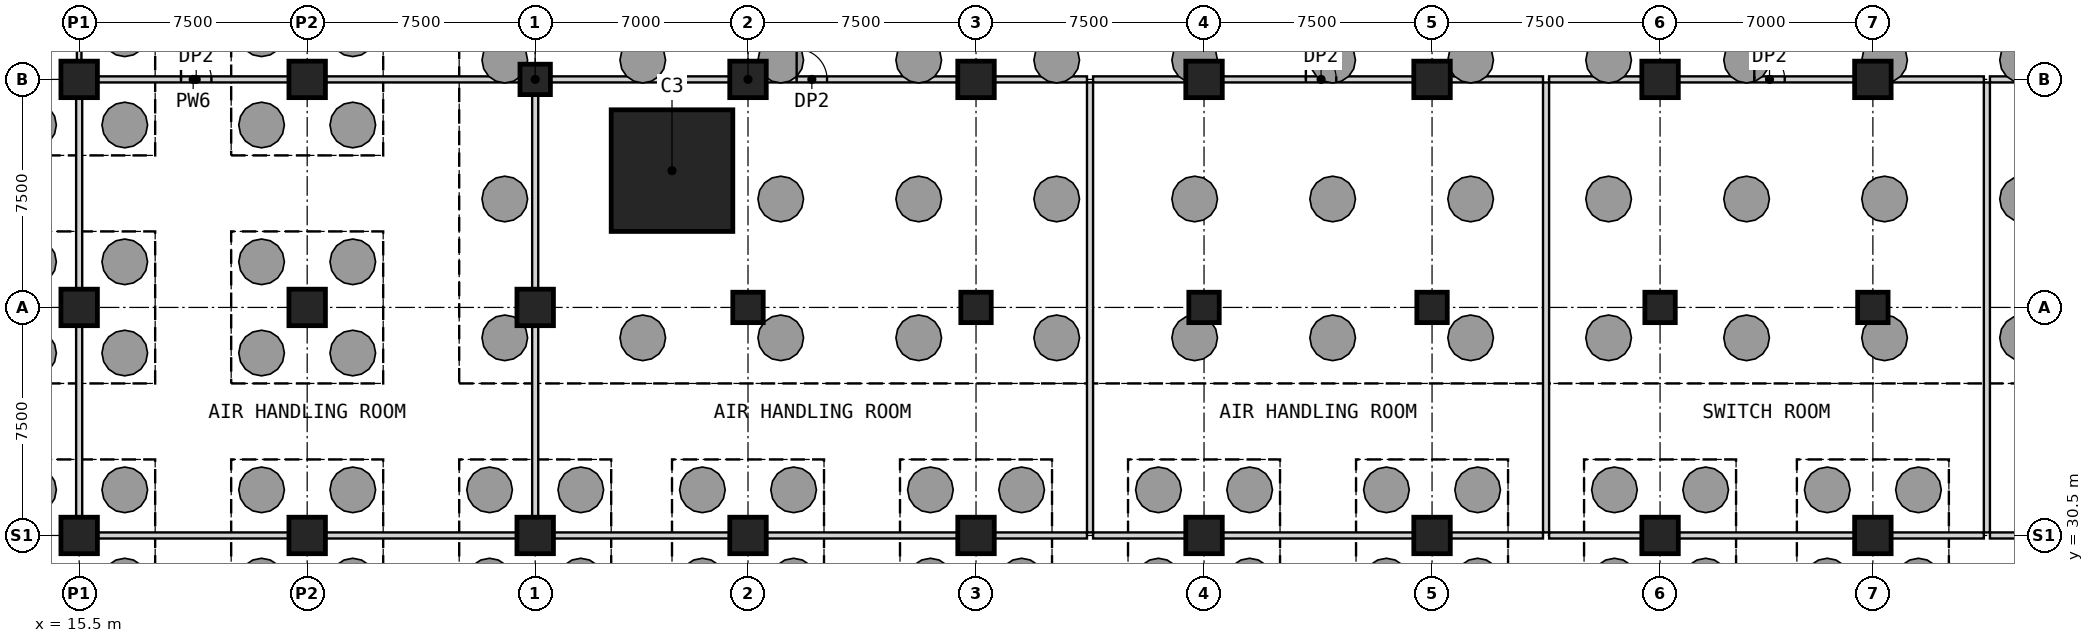
"""IFC4 building model, lengths in metres.
Left out: names, types, materials, properties, quantities, classifications, styles, units other than length and angle.
Written with IfcOpenShell. Run it as: python <this file> out.ifc"""

import sys

from ifc_helpers import new_model, si_unit, direction, frame, frame_2d, origin, origin_2d, place, context, subcontext, project, spatial, rectangle, extrude, element, fill, save


model = new_model("IFC4")
c1 = context("Model", 3, precision=1e-05, world=origin(), true_north=direction((0.0, 1.0)))
c2 = subcontext(c1, "Body", "Model", "MODEL_VIEW")
j1 = project(units=[si_unit("LENGTHUNIT", "METRE"), si_unit("PLANEANGLEUNIT", "RADIAN")], contexts=[c1])
p1 = place(None, origin())
s1 = spatial("IfcSite", under=j1, at=p1, CompositionType="ELEMENT")
p2 = place(p1, origin())
s2 = spatial("IfcBuilding", under=s1, at=p2, CompositionType="ELEMENT")
p3 = place(p2, frame((0.0, 0.0, -12.0)))
s3 = spatial("IfcBuildingStorey", under=s2, at=p3, CompositionType="ELEMENT", Elevation=-12.0)
for number, where, z_axis, x_axis in (
    (1, (30.5, 45.5, 0.0), (0.0, 0.0, 1.0), (1.0, 0.0, 0.0)),
    (2, (37.5, 38.0, 0.0), (0.0, 0.0, 1.0), (1.0, 0.0, 0.0)),
):
    element("IfcColumn", number, at=place(p3, frame(where, z_axis=z_axis, x_axis=x_axis)), inside=s3, PredefinedType="COLUMN", context=c2, shape_type="SweptSolid", body=[
        extrude(rectangle(XDim=1.0, YDim=1.0, at=origin_2d()), origin(), (0.0, 0.0, 1.0), 6.0),
    ])
p4 = place(p3, frame((37.5, 45.5, 0.0), z_axis=(0.0, 0.0, 1.0), x_axis=(1.0, 0.0, 0.0)))
e3 = element("IfcColumn", 3, at=p4, inside=s3, PredefinedType="COLUMN", context=c2, shape_type="SweptSolid", body=[
    extrude(rectangle(XDim=1.2, YDim=1.2, at=origin_2d()), origin(), (0.0, 0.0, 1.0), 6.0),
])
p5 = place(p3, frame((45.0, 38.0, 0.0), z_axis=(0.0, 0.0, 1.0), x_axis=(1.0, 0.0, 0.0)))
e4 = element("IfcColumn", 4, at=p5, inside=s3, PredefinedType="COLUMN", context=c2, shape_type="SweptSolid", body=[
    extrude(rectangle(XDim=1.0, YDim=1.0, at=origin_2d()), origin(), (0.0, 0.0, 1.0), 6.0),
])
p6 = place(p3, frame((45.0, 45.5, 0.0), z_axis=(0.0, 0.0, 1.0), x_axis=(1.0, 0.0, 0.0)))
e5 = element("IfcColumn", 5, at=p6, inside=s3, PredefinedType="COLUMN", context=c2, shape_type="SweptSolid", body=[
    extrude(rectangle(XDim=1.2, YDim=1.2, at=origin_2d()), origin(), (0.0, 0.0, 1.0), 6.0),
])
p7 = place(p3, frame((52.5, 38.0, 0.0), z_axis=(0.0, 0.0, 1.0), x_axis=(1.0, 0.0, 0.0)))
e6 = element("IfcColumn", 6, at=p7, inside=s3, PredefinedType="COLUMN", context=c2, shape_type="SweptSolid", body=[
    extrude(rectangle(XDim=1.0, YDim=1.0, at=origin_2d()), origin(), (0.0, 0.0, 1.0), 6.0),
])
p8 = place(p3, frame((52.5, 45.5, 0.0), z_axis=(0.0, 0.0, 1.0), x_axis=(1.0, 0.0, 0.0)))
e7 = element("IfcColumn", 7, at=p8, inside=s3, PredefinedType="COLUMN", context=c2, shape_type="SweptSolid", body=[
    extrude(rectangle(XDim=1.2, YDim=1.2, at=origin_2d()), origin(), (0.0, 0.0, 1.0), 6.0),
])
p9 = place(p3, frame((60.0, 38.0, 0.0), z_axis=(0.0, 0.0, 1.0), x_axis=(1.0, 0.0, 0.0)))
e8 = element("IfcColumn", 8, at=p9, inside=s3, PredefinedType="COLUMN", context=c2, shape_type="SweptSolid", body=[
    extrude(rectangle(XDim=1.0, YDim=1.0, at=origin_2d()), origin(), (0.0, 0.0, 1.0), 6.0),
])
p10 = place(p3, frame((60.0, 45.5, 0.0), z_axis=(0.0, 0.0, 1.0), x_axis=(1.0, 0.0, 0.0)))
e9 = element("IfcColumn", 9, at=p10, inside=s3, PredefinedType="COLUMN", context=c2, shape_type="SweptSolid", body=[
    extrude(rectangle(XDim=1.2, YDim=1.2, at=origin_2d()), origin(), (0.0, 0.0, 1.0), 6.0),
])
p11 = place(p3, frame((67.5, 38.0, 0.0), z_axis=(0.0, 0.0, 1.0), x_axis=(1.0, 0.0, 0.0)))
e10 = element("IfcColumn", 10, at=p11, inside=s3, PredefinedType="COLUMN", context=c2, shape_type="SweptSolid", body=[
    extrude(rectangle(XDim=1.0, YDim=1.0, at=origin_2d()), origin(), (0.0, 0.0, 1.0), 6.0),
])
p12 = place(p3, frame((67.5, 45.5, 0.0), z_axis=(0.0, 0.0, 1.0), x_axis=(1.0, 0.0, 0.0)))
e11 = element("IfcColumn", 11, at=p12, inside=s3, PredefinedType="COLUMN", context=c2, shape_type="SweptSolid", body=[
    extrude(rectangle(XDim=1.2, YDim=1.2, at=origin_2d()), origin(), (0.0, 0.0, 1.0), 6.0),
])
p13 = place(p3, frame((74.5, 38.0, 0.0), z_axis=(0.0, 0.0, 1.0), x_axis=(1.0, 0.0, 0.0)))
e12 = element("IfcColumn", 12, at=p13, inside=s3, PredefinedType="COLUMN", context=c2, shape_type="SweptSolid", body=[
    extrude(rectangle(XDim=1.0, YDim=1.0, at=origin_2d()), origin(), (0.0, 0.0, 1.0), 6.0),
])
p14 = place(p3, frame((74.5, 45.5, 0.0), z_axis=(0.0, 0.0, 1.0), x_axis=(1.0, 0.0, 0.0)))
e13 = element("IfcColumn", 13, at=p14, inside=s3, PredefinedType="COLUMN", context=c2, shape_type="SweptSolid", body=[
    extrude(rectangle(XDim=1.2, YDim=1.2, at=origin_2d()), origin(), (0.0, 0.0, 1.0), 6.0),
])
p15 = place(p3, frame((35.0, 42.5, 0.0), z_axis=(0.0, 0.0, 1.0), x_axis=(1.0, 0.0, 0.0)))
e14 = element("IfcColumn", 14, at=p15, inside=s3, PredefinedType="COLUMN", context=c2, shape_type="SweptSolid", body=[
    extrude(rectangle(XDim=4.0, YDim=4.0, at=origin_2d()), origin(), (0.0, 0.0, 1.0), 6.0),
])
for number, where, z_axis, x_axis in (
    (15, (15.5, 30.5, 0.0), (0.0, 0.0, 1.0), (1.0, 0.0, 0.0)),
    (16, (15.5, 38.0, 0.0), (0.0, 0.0, 1.0), (1.0, 0.0, 0.0)),
    (17, (15.5, 45.5, 0.0), (0.0, 0.0, 1.0), (1.0, 0.0, 0.0)),
    (18, (23.0, 30.5, 0.0), (0.0, 0.0, 1.0), (1.0, 0.0, 0.0)),
    (19, (23.0, 38.0, 0.0), (0.0, 0.0, 1.0), (1.0, 0.0, 0.0)),
    (20, (23.0, 45.5, 0.0), (0.0, 0.0, 1.0), (1.0, 0.0, 0.0)),
    (21, (30.5, 30.5, 0.0), (0.0, 0.0, 1.0), (1.0, 0.0, 0.0)),
    (22, (30.5, 38.0, 0.0), (0.0, 0.0, 1.0), (1.0, 0.0, 0.0)),
    (23, (37.5, 30.5, 0.0), (0.0, 0.0, 1.0), (1.0, 0.0, 0.0)),
    (24, (45.0, 30.5, 0.0), (0.0, 0.0, 1.0), (1.0, 0.0, 0.0)),
    (25, (52.5, 30.5, 0.0), (0.0, 0.0, 1.0), (1.0, 0.0, 0.0)),
    (26, (60.0, 30.5, 0.0), (0.0, 0.0, 1.0), (1.0, 0.0, 0.0)),
    (27, (67.5, 30.5, 0.0), (0.0, 0.0, 1.0), (1.0, 0.0, 0.0)),
    (28, (74.5, 30.5, 0.0), (0.0, 0.0, 1.0), (1.0, 0.0, 0.0)),
):
    element("IfcColumn", number, at=place(p3, frame(where, z_axis=z_axis, x_axis=x_axis)), inside=s3, PredefinedType="COLUMN", context=c2, shape_type="SweptSolid", body=[
        extrude(rectangle(XDim=1.2, YDim=1.2, at=origin_2d()), origin(), (0.0, 0.0, 1.0), 6.0),
    ])
p16 = place(p3, frame((16.1, 45.5, 0.0), z_axis=(0.0, 0.0, 1.0), x_axis=(1.0, 0.0, 0.0)))
e29 = element("IfcWall", 29, at=p16, inside=s3, PredefinedType="PARTITIONING", context=c2, shape_type="SweptSolid", body=[
    extrude(rectangle(XDim=6.3, YDim=0.2, at=frame_2d((3.15, 0.0))), origin(), (0.0, 0.0, 1.0), 5.4),
])
p17 = place(p16, frame((2.75, 0.0, 0.0)))
e30 = element("IfcOpeningElement", 30, at=p17, cuts=e29, PredefinedType="OPENING", context=c2, shape_type="SweptSolid", body=[
    extrude(rectangle(XDim=1.0, YDim=2.1, at=frame_2d((0.5, 1.05))), frame((0.0, 0.11, 0.0), z_axis=(0.0, -1.0, 0.0), x_axis=(1.0, 0.0, 0.0)), (0.0, 0.0, 1.0), 0.22),
])
p18 = place(p3, frame((23.6, 45.5, 0.0), z_axis=(0.0, 0.0, 1.0), x_axis=(1.0, 0.0, 0.0)))
e31 = element("IfcWall", 31, at=p18, inside=s3, PredefinedType="PARTITIONING", context=c2, shape_type="SweptSolid", body=[
    extrude(rectangle(XDim=6.4, YDim=0.2, at=frame_2d((3.2, 0.0))), origin(), (0.0, 0.0, 1.0), 5.4),
])
p19 = place(p3, frame((31.0, 45.5, 0.0), z_axis=(0.0, 0.0, 1.0), x_axis=(1.0, 0.0, 0.0)))
e32 = element("IfcWall", 32, at=p19, inside=s3, PredefinedType="PARTITIONING", context=c2, shape_type="SweptSolid", body=[
    extrude(rectangle(XDim=5.9, YDim=0.2, at=frame_2d((2.95, 0.0))), origin(), (0.0, 0.0, 1.0), 5.4),
])
p20 = place(p3, frame((38.1, 45.5, 0.0), z_axis=(0.0, 0.0, 1.0), x_axis=(1.0, 0.0, 0.0)))
e33 = element("IfcWall", 33, at=p20, inside=s3, PredefinedType="PARTITIONING", context=c2, shape_type="SweptSolid", body=[
    extrude(rectangle(XDim=6.3, YDim=0.2, at=frame_2d((3.15, 0.0))), origin(), (0.0, 0.0, 1.0), 5.4),
])
p21 = place(p20, frame((1.0, 0.0, 0.0)))
e34 = element("IfcOpeningElement", 34, at=p21, cuts=e33, PredefinedType="OPENING", context=c2, shape_type="SweptSolid", body=[
    extrude(rectangle(XDim=1.0, YDim=2.1, at=frame_2d((0.5, 1.05))), frame((0.0, 0.11, 0.0), z_axis=(0.0, -1.0, 0.0), x_axis=(1.0, 0.0, 0.0)), (0.0, 0.0, 1.0), 0.22),
])
for number, where, z_axis, x_axis in (
    (35, (45.6, 45.5, 0.0), (0.0, 0.0, 1.0), (1.0, 0.0, 0.0)),
    (36, (48.85, 45.5, 0.0), (0.0, 0.0, 1.0), (1.0, 0.0, 0.0)),
):
    element("IfcWall", number, at=place(p3, frame(where, z_axis=z_axis, x_axis=x_axis)), inside=s3, PredefinedType="PARTITIONING", context=c2, shape_type="SweptSolid", body=[
        extrude(rectangle(XDim=3.05, YDim=0.2, at=frame_2d((1.525, 0.0))), origin(), (0.0, 0.0, 1.0), 5.4),
    ])
p22 = place(p3, frame((53.1, 45.5, 0.0), z_axis=(0.0, 0.0, 1.0), x_axis=(1.0, 0.0, 0.0)))
e37 = element("IfcWall", 37, at=p22, inside=s3, PredefinedType="PARTITIONING", context=c2, shape_type="SweptSolid", body=[
    extrude(rectangle(XDim=6.3, YDim=0.2, at=frame_2d((3.15, 0.0))), origin(), (0.0, 0.0, 1.0), 5.4),
])
p23 = place(p22, frame((2.75, 0.0, 0.0)))
e38 = element("IfcOpeningElement", 38, at=p23, cuts=e37, PredefinedType="OPENING", context=c2, shape_type="SweptSolid", body=[
    extrude(rectangle(XDim=1.0, YDim=2.1, at=frame_2d((0.5, 1.05))), frame((0.0, 0.11, 0.0), z_axis=(0.0, -1.0, 0.0), x_axis=(1.0, 0.0, 0.0)), (0.0, 0.0, 1.0), 0.22),
])
for number, where, z_axis, x_axis in (
    (39, (60.6, 45.5, 0.0), (0.0, 0.0, 1.0), (1.0, 0.0, 0.0)),
    (40, (63.85, 45.5, 0.0), (0.0, 0.0, 1.0), (1.0, 0.0, 0.0)),
):
    element("IfcWall", number, at=place(p3, frame(where, z_axis=z_axis, x_axis=x_axis)), inside=s3, PredefinedType="PARTITIONING", context=c2, shape_type="SweptSolid", body=[
        extrude(rectangle(XDim=3.05, YDim=0.2, at=frame_2d((1.525, 0.0))), origin(), (0.0, 0.0, 1.0), 5.4),
    ])
p24 = place(p3, frame((68.1, 45.5, 0.0), z_axis=(0.0, 0.0, 1.0), x_axis=(1.0, 0.0, 0.0)))
e41 = element("IfcWall", 41, at=p24, inside=s3, PredefinedType="PARTITIONING", context=c2, shape_type="SweptSolid", body=[
    extrude(rectangle(XDim=5.8, YDim=0.2, at=frame_2d((2.9, 0.0))), origin(), (0.0, 0.0, 1.0), 5.4),
])
p25 = place(p24, frame((2.5, 0.0, 0.0)))
e42 = element("IfcOpeningElement", 42, at=p25, cuts=e41, PredefinedType="OPENING", context=c2, shape_type="SweptSolid", body=[
    extrude(rectangle(XDim=1.0, YDim=2.1, at=frame_2d((0.5, 1.05))), frame((0.0, 0.11, 0.0), z_axis=(0.0, -1.0, 0.0), x_axis=(1.0, 0.0, 0.0)), (0.0, 0.0, 1.0), 0.22),
])
for number, where, z_axis, x_axis in (
    (43, (75.1, 45.5, 0.0), (0.0, 0.0, 1.0), (1.0, 0.0, 0.0)),
    (44, (78.35, 45.5, 0.0), (0.0, 0.0, 1.0), (1.0, 0.0, 0.0)),
):
    element("IfcWall", number, at=place(p3, frame(where, z_axis=z_axis, x_axis=x_axis)), inside=s3, PredefinedType="PARTITIONING", context=c2, shape_type="SweptSolid", body=[
        extrude(rectangle(XDim=3.05, YDim=0.2, at=frame_2d((1.525, 0.0))), origin(), (0.0, 0.0, 1.0), 5.4),
    ])
for number, where, z_axis, x_axis in (
    (45, (16.1, 30.5, 0.0), (0.0, 0.0, 1.0), (1.0, 0.0, 0.0)),
    (46, (23.6, 30.5, 0.0), (0.0, 0.0, 1.0), (1.0, 0.0, 0.0)),
):
    element("IfcWall", number, at=place(p3, frame(where, z_axis=z_axis, x_axis=x_axis)), inside=s3, PredefinedType="PARTITIONING", context=c2, shape_type="SweptSolid", body=[
        extrude(rectangle(XDim=6.3, YDim=0.2, at=frame_2d((3.15, 0.0))), origin(), (0.0, 0.0, 1.0), 5.4),
    ])
p26 = place(p3, frame((31.1, 30.5, 0.0), z_axis=(0.0, 0.0, 1.0), x_axis=(1.0, 0.0, 0.0)))
e47 = element("IfcWall", 47, at=p26, inside=s3, PredefinedType="PARTITIONING", context=c2, shape_type="SweptSolid", body=[
    extrude(rectangle(XDim=5.8, YDim=0.2, at=frame_2d((2.9, 0.0))), origin(), (0.0, 0.0, 1.0), 5.4),
])
p27 = place(p3, frame((38.1, 30.5, 0.0), z_axis=(0.0, 0.0, 1.0), x_axis=(1.0, 0.0, 0.0)))
e48 = element("IfcWall", 48, at=p27, inside=s3, PredefinedType="PARTITIONING", context=c2, shape_type="SweptSolid", body=[
    extrude(rectangle(XDim=6.3, YDim=0.2, at=frame_2d((3.15, 0.0))), origin(), (0.0, 0.0, 1.0), 5.4),
])
for number, where, z_axis, x_axis in (
    (49, (45.6, 30.5, 0.0), (0.0, 0.0, 1.0), (1.0, 0.0, 0.0)),
    (50, (48.85, 30.5, 0.0), (0.0, 0.0, 1.0), (1.0, 0.0, 0.0)),
):
    element("IfcWall", number, at=place(p3, frame(where, z_axis=z_axis, x_axis=x_axis)), inside=s3, PredefinedType="PARTITIONING", context=c2, shape_type="SweptSolid", body=[
        extrude(rectangle(XDim=3.05, YDim=0.2, at=frame_2d((1.525, 0.0))), origin(), (0.0, 0.0, 1.0), 5.4),
    ])
p28 = place(p3, frame((53.1, 30.5, 0.0), z_axis=(0.0, 0.0, 1.0), x_axis=(1.0, 0.0, 0.0)))
e51 = element("IfcWall", 51, at=p28, inside=s3, PredefinedType="PARTITIONING", context=c2, shape_type="SweptSolid", body=[
    extrude(rectangle(XDim=6.3, YDim=0.2, at=frame_2d((3.15, 0.0))), origin(), (0.0, 0.0, 1.0), 5.4),
])
for number, where, z_axis, x_axis in (
    (52, (60.6, 30.5, 0.0), (0.0, 0.0, 1.0), (1.0, 0.0, 0.0)),
    (53, (63.85, 30.5, 0.0), (0.0, 0.0, 1.0), (1.0, 0.0, 0.0)),
):
    element("IfcWall", number, at=place(p3, frame(where, z_axis=z_axis, x_axis=x_axis)), inside=s3, PredefinedType="PARTITIONING", context=c2, shape_type="SweptSolid", body=[
        extrude(rectangle(XDim=3.05, YDim=0.2, at=frame_2d((1.525, 0.0))), origin(), (0.0, 0.0, 1.0), 5.4),
    ])
p29 = place(p3, frame((68.1, 30.5, 0.0), z_axis=(0.0, 0.0, 1.0), x_axis=(1.0, 0.0, 0.0)))
e54 = element("IfcWall", 54, at=p29, inside=s3, PredefinedType="PARTITIONING", context=c2, shape_type="SweptSolid", body=[
    extrude(rectangle(XDim=5.8, YDim=0.2, at=frame_2d((2.9, 0.0))), origin(), (0.0, 0.0, 1.0), 5.4),
])
for number, where, z_axis, x_axis in (
    (55, (75.1, 30.5, 0.0), (0.0, 0.0, 1.0), (1.0, 0.0, 0.0)),
    (56, (78.35, 30.5, 0.0), (0.0, 0.0, 1.0), (1.0, 0.0, 0.0)),
):
    element("IfcWall", number, at=place(p3, frame(where, z_axis=z_axis, x_axis=x_axis)), inside=s3, PredefinedType="PARTITIONING", context=c2, shape_type="SweptSolid", body=[
        extrude(rectangle(XDim=3.05, YDim=0.2, at=frame_2d((1.525, 0.0))), origin(), (0.0, 0.0, 1.0), 5.4),
    ])
for number, where, z_axis, x_axis in (
    (57, (15.5, 31.1, 0.0), (0.0, 0.0, 1.0), (0.0, 1.0, 0.0)),
    (58, (15.5, 38.6, 0.0), (0.0, 0.0, 1.0), (0.0, 1.0, 0.0)),
):
    element("IfcWall", number, at=place(p3, frame(where, z_axis=z_axis, x_axis=x_axis)), inside=s3, PredefinedType="PARTITIONING", context=c2, shape_type="SweptSolid", body=[
        extrude(rectangle(XDim=6.3, YDim=0.2, at=frame_2d((3.15, 0.0))), origin(), (0.0, 0.0, 1.0), 5.4),
    ])
p30 = place(p3, frame((15.5, 46.1, 0.0), z_axis=(0.0, 0.0, 1.0), x_axis=(0.0, 1.0, 0.0)))
e59 = element("IfcWall", 59, at=p30, inside=s3, PredefinedType="PARTITIONING", context=c2, shape_type="SweptSolid", body=[
    extrude(rectangle(XDim=5.8, YDim=0.15, at=frame_2d((2.9, 0.0))), origin(), (0.0, 0.0, 1.0), 5.4),
])
p31 = place(p3, frame((30.5, 31.1, 0.0), z_axis=(0.0, 0.0, 1.0), x_axis=(0.0, 1.0, 0.0)))
e60 = element("IfcWall", 60, at=p31, inside=s3, PredefinedType="PARTITIONING", context=c2, shape_type="SweptSolid", body=[
    extrude(rectangle(XDim=6.3, YDim=0.2, at=frame_2d((3.15, 0.0))), origin(), (0.0, 0.0, 1.0), 5.4),
])
p32 = place(p3, frame((30.5, 38.6, 0.0), z_axis=(0.0, 0.0, 1.0), x_axis=(0.0, 1.0, 0.0)))
e61 = element("IfcWall", 61, at=p32, inside=s3, PredefinedType="PARTITIONING", context=c2, shape_type="SweptSolid", body=[
    extrude(rectangle(XDim=6.4, YDim=0.2, at=frame_2d((3.2, 0.0))), origin(), (0.0, 0.0, 1.0), 5.4),
])
for number, where, z_axis, x_axis in (
    (62, (48.75, 30.6, 0.0), (0.0, 0.0, 1.0), (0.0, 1.0, 0.0)),
    (63, (63.75, 30.6, 0.0), (0.0, 0.0, 1.0), (0.0, 1.0, 0.0)),
    (64, (78.25, 30.6, 0.0), (0.0, 0.0, 1.0), (0.0, 1.0, 0.0)),
):
    element("IfcWall", number, at=place(p3, frame(where, z_axis=z_axis, x_axis=x_axis)), inside=s3, PredefinedType="PARTITIONING", context=c2, shape_type="SweptSolid", body=[
        extrude(rectangle(XDim=14.8, YDim=0.2, at=frame_2d((7.4, 0.0))), origin(), (0.0, 0.0, 1.0), 5.4),
    ])
p33 = place(p17, origin())
e65 = element("IfcDoor", 65, at=p33, inside=s3, OperationType="SINGLE_SWING_LEFT", PredefinedType="DOOR", context=c2, shape_type="SweptSolid", body=[
    extrude(rectangle(XDim=1.0, YDim=2.1, at=frame_2d((0.5, 1.05))), frame((0.0, 0.025, 0.0), z_axis=(0.0, -1.0, 0.0), x_axis=(1.0, 0.0, 0.0)), (0.0, 0.0, 1.0), 0.05),
])
fill(e30, e65)
p34 = place(p21, origin())
e66 = element("IfcDoor", 66, at=p34, inside=s3, OperationType="SINGLE_SWING_LEFT", PredefinedType="DOOR", context=c2, shape_type="SweptSolid", body=[
    extrude(rectangle(XDim=1.0, YDim=2.1, at=frame_2d((0.5, 1.05))), frame((0.0, 0.025, 0.0), z_axis=(0.0, -1.0, 0.0), x_axis=(1.0, 0.0, 0.0)), (0.0, 0.0, 1.0), 0.05),
])
fill(e34, e66)
p35 = place(p23, origin())
e67 = element("IfcDoor", 67, at=p35, inside=s3, OperationType="SINGLE_SWING_LEFT", PredefinedType="DOOR", context=c2, shape_type="SweptSolid", body=[
    extrude(rectangle(XDim=1.0, YDim=2.1, at=frame_2d((0.5, 1.05))), frame((0.0, 0.025, 0.0), z_axis=(0.0, -1.0, 0.0), x_axis=(1.0, 0.0, 0.0)), (0.0, 0.0, 1.0), 0.05),
])
fill(e38, e67)
p36 = place(p25, origin())
e68 = element("IfcDoor", 68, at=p36, inside=s3, OperationType="SINGLE_SWING_LEFT", PredefinedType="DOOR", context=c2, shape_type="SweptSolid", body=[
    extrude(rectangle(XDim=1.0, YDim=2.1, at=frame_2d((0.5, 1.05))), frame((0.0, 0.025, 0.0), z_axis=(0.0, -1.0, 0.0), x_axis=(1.0, 0.0, 0.0)), (0.0, 0.0, 1.0), 0.05),
])
fill(e42, e68)
save(model, sys.argv[1])
